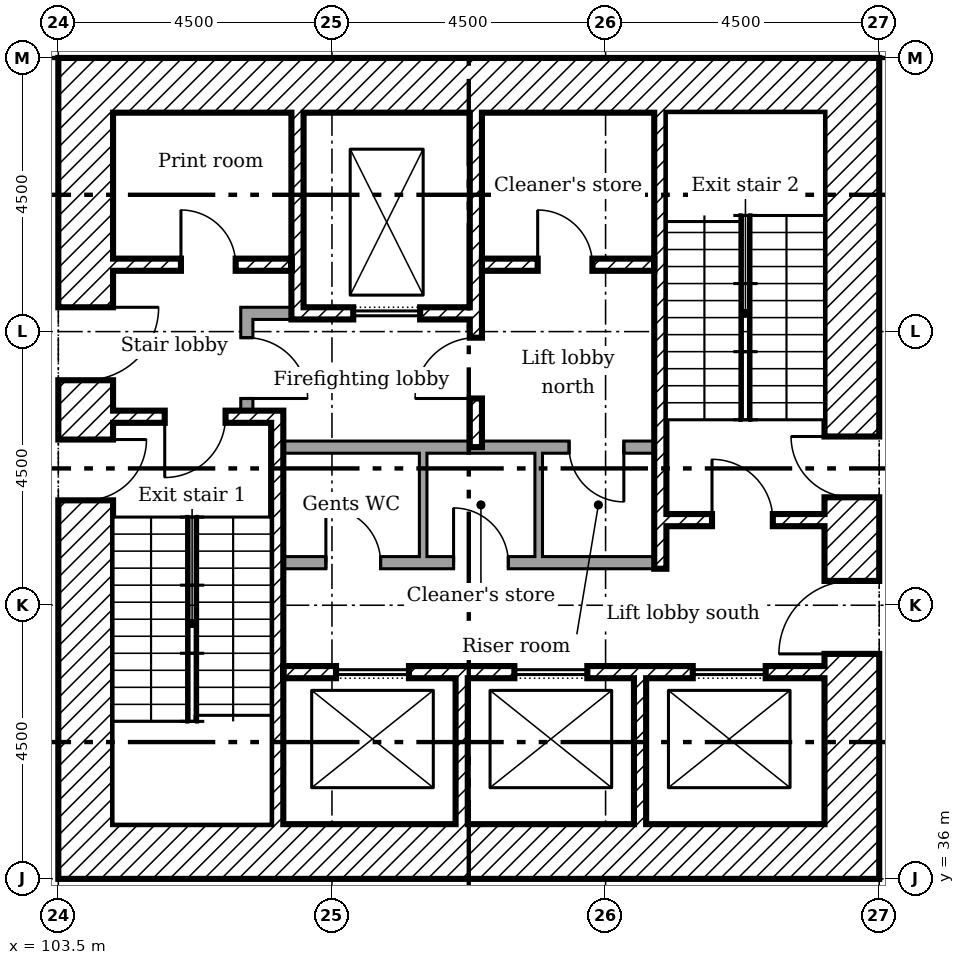
"""IFC4 building model, lengths in metres.
Left out: names, types, materials, properties, quantities, classifications, styles, units other than length and angle.
Written with IfcOpenShell. Run it as: python <this file> out.ifc"""

import sys

from ifc_helpers import new_model, si_unit, direction, frame, frame_2d, origin, place, context, subcontext, project, spatial, rectangle, extrude, element, fill, save


model = new_model("IFC4")
c1 = context("Model", 3, precision=1e-05, world=origin(), true_north=direction((0.0, 1.0)))
c2 = subcontext(c1, "Body", "Model", "MODEL_VIEW")
j1 = project(units=[si_unit("LENGTHUNIT", "METRE"), si_unit("PLANEANGLEUNIT", "RADIAN")], contexts=[c1])
p1 = place(None, origin())
s1 = spatial("IfcSite", under=j1, at=p1, CompositionType="ELEMENT")
p2 = place(p1, origin())
s2 = spatial("IfcBuilding", under=s1, at=p2, CompositionType="ELEMENT")
p3 = place(p2, frame((0.0, 0.0, 21.0)))
s3 = spatial("IfcBuildingStorey", under=s2, at=p3, CompositionType="ELEMENT", Elevation=21.0)
p4 = place(p3, frame((116.55, 36.0, 0.0), z_axis=(0.0, 0.0, 1.0), x_axis=(0.0, 1.0, 0.0)))
e1 = element("IfcWall", 1, at=p4, inside=s3, PredefinedType="SHEAR", context=c2, shape_type="SweptSolid", body=[
    extrude(rectangle(XDim=13.5, YDim=0.9, at=frame_2d((6.75, 0.0))), origin(), (0.0, 0.0, 1.0), 4.125),
])
p5 = place(p4, frame((3.7, 0.0, 0.0)))
e2 = element("IfcOpeningElement", 2, at=p5, cuts=e1, PredefinedType="OPENING", context=c2, shape_type="SweptSolid", body=[
    extrude(rectangle(XDim=1.2, YDim=2.1, at=frame_2d((0.6, 1.05))), frame((0.0, 0.46, 0.0), z_axis=(0.0, -1.0, 0.0), x_axis=(1.0, 0.0, 0.0)), (0.0, 0.0, 1.0), 0.92),
])
p6 = place(p4, frame((6.275, 0.0, 0.0)))
e3 = element("IfcOpeningElement", 3, at=p6, cuts=e1, PredefinedType="OPENING", context=c2, shape_type="SweptSolid", body=[
    extrude(rectangle(XDim=1.0, YDim=2.1, at=frame_2d((0.5, 1.05))), frame((0.0, 0.46, 0.0), z_axis=(0.0, -1.0, 0.0), x_axis=(1.0, 0.0, 0.0)), (0.0, 0.0, 1.0), 0.92),
])
for number, where in (
    (4, (104.4, 49.05, 0.0)),
    (5, (104.4, 36.45, 0.0)),
):
    element("IfcWall", number, at=place(p3, frame(where)), inside=s3, PredefinedType="SHEAR", context=c2, shape_type="SweptSolid", body=[
        extrude(rectangle(XDim=11.7, YDim=0.9, at=frame_2d((5.85, 0.0))), origin(), (0.0, 0.0, 1.0), 4.125),
    ])
p7 = place(p3, frame((103.95, 36.0, 0.0), z_axis=(0.0, 0.0, 1.0), x_axis=(0.0, 1.0, 0.0)))
e6 = element("IfcWall", 6, at=p7, inside=s3, PredefinedType="SHEAR", context=c2, shape_type="SweptSolid", body=[
    extrude(rectangle(XDim=13.5, YDim=0.9, at=frame_2d((6.75, 0.0))), origin(), (0.0, 0.0, 1.0), 4.125),
])
p8 = place(p7, frame((8.2, 0.0, 0.0)))
e7 = element("IfcOpeningElement", 7, at=p8, cuts=e6, PredefinedType="OPENING", context=c2, shape_type="SweptSolid", body=[
    extrude(rectangle(XDim=1.2, YDim=2.1, at=frame_2d((0.6, 1.05))), frame((0.0, 0.46, 0.0), z_axis=(0.0, -1.0, 0.0), x_axis=(1.0, 0.0, 0.0)), (0.0, 0.0, 1.0), 0.92),
])
p9 = place(p7, frame((6.225, 0.0, 0.0)))
e8 = element("IfcOpeningElement", 8, at=p9, cuts=e6, PredefinedType="OPENING", context=c2, shape_type="SweptSolid", body=[
    extrude(rectangle(XDim=1.0, YDim=2.1, at=frame_2d((0.5, 1.05))), frame((0.0, 0.46, 0.0), z_axis=(0.0, -1.0, 0.0), x_axis=(1.0, 0.0, 0.0)), (0.0, 0.0, 1.0), 0.92),
])
p10 = place(p3, frame((107.433, 48.6, 0.0), z_axis=(0.0, 0.0, 1.0), x_axis=(0.0, -1.0, 0.0)))
e9 = element("IfcWall", 9, at=p10, inside=s3, PredefinedType="SHEAR", context=c2, shape_type="SweptSolid", body=[
    extrude(rectangle(XDim=3.4, YDim=0.2, at=frame_2d((1.7, 0.0))), origin(), (0.0, 0.0, 1.0), 4.125),
])
p11 = place(p3, frame((110.367, 48.6, 0.0), z_axis=(0.0, 0.0, 1.0), x_axis=(0.0, -1.0, 0.0)))
e10 = element("IfcWall", 10, at=p11, inside=s3, PredefinedType="SHEAR", context=c2, shape_type="SweptSolid", body=[
    extrude(rectangle(XDim=5.5, YDim=0.2, at=frame_2d((2.75, 0.0))), origin(), (0.0, 0.0, 1.0), 4.125),
])
p12 = place(p11, frame((3.7, 0.0, 0.0)))
e11 = element("IfcOpeningElement", 11, at=p12, cuts=e10, PredefinedType="OPENING", context=c2, shape_type="SweptSolid", body=[
    extrude(rectangle(XDim=1.0, YDim=2.1, at=frame_2d((0.5, 1.05))), frame((0.0, 0.11, 0.0), z_axis=(0.0, -1.0, 0.0), x_axis=(1.0, 0.0, 0.0)), (0.0, 0.0, 1.0), 0.22),
])
for number, where, z_axis, x_axis in (
    (12, (110.133, 36.9, 0.0), (0.0, 0.0, 1.0), (0.0, 1.0, 0.0)),
    (13, (113.067, 36.9, 0.0), (0.0, 0.0, 1.0), (0.0, 1.0, 0.0)),
):
    element("IfcWall", number, at=place(p3, frame(where, z_axis=z_axis, x_axis=x_axis)), inside=s3, PredefinedType="SHEAR", context=c2, shape_type="SweptSolid", body=[
        extrude(rectangle(XDim=2.4, YDim=0.2, at=frame_2d((1.2, 0.0))), origin(), (0.0, 0.0, 1.0), 4.125),
    ])
p13 = place(p3, frame((106.5, 45.3, 0.0)))
e14 = element("IfcWall", 14, at=p13, inside=s3, PredefinedType="PARTITIONING", context=c2, shape_type="SweptSolid", body=[
    extrude(rectangle(XDim=0.833, YDim=0.2, at=frame_2d((0.417, 0.0))), origin(), (0.0, 0.0, 1.0), 4.125),
])
p14 = place(p3, frame((106.6, 43.7, 0.0), z_axis=(0.0, 0.0, 1.0), x_axis=(0.0, 1.0, 0.0)))
e15 = element("IfcWall", 15, at=p14, inside=s3, PredefinedType="PARTITIONING", context=c2, shape_type="SweptSolid", body=[
    extrude(rectangle(XDim=1.5, YDim=0.2, at=frame_2d((0.75, 0.0))), origin(), (0.0, 0.0, 1.0), 4.125),
])
p15 = place(p14, frame((0.2, 0.0, 0.0)))
e16 = element("IfcOpeningElement", 16, at=p15, cuts=e15, PredefinedType="OPENING", context=c2, shape_type="SweptSolid", body=[
    extrude(rectangle(XDim=1.0, YDim=2.1, at=frame_2d((0.5, 1.05))), frame((0.0, 0.11, 0.0), z_axis=(0.0, -1.0, 0.0), x_axis=(1.0, 0.0, 0.0)), (0.0, 0.0, 1.0), 0.22),
])
p16 = place(p3, frame((104.4, 46.1, 0.0)))
e17 = element("IfcWall", 17, at=p16, inside=s3, PredefinedType="SHEAR", context=c2, shape_type="SweptSolid", body=[
    extrude(rectangle(XDim=2.933, YDim=0.2, at=frame_2d((1.467, 0.0))), origin(), (0.0, 0.0, 1.0), 4.125),
])
p17 = place(p16, frame((1.117, 0.0, 0.0)))
e18 = element("IfcOpeningElement", 18, at=p17, cuts=e17, PredefinedType="OPENING", context=c2, shape_type="SweptSolid", body=[
    extrude(rectangle(XDim=0.9, YDim=2.1, at=frame_2d((0.45, 1.05))), frame((0.0, 0.11, 0.0), z_axis=(0.0, -1.0, 0.0), x_axis=(1.0, 0.0, 0.0)), (0.0, 0.0, 1.0), 0.22),
])
p18 = place(p3, frame((110.467, 46.1, 0.0)))
e19 = element("IfcWall", 19, at=p18, inside=s3, PredefinedType="SHEAR", context=c2, shape_type="SweptSolid", body=[
    extrude(rectangle(XDim=2.833, YDim=0.2, at=frame_2d((1.417, 0.0))), origin(), (0.0, 0.0, 1.0), 4.125),
])
p19 = place(p18, frame((0.917, 0.0, 0.0)))
e20 = element("IfcOpeningElement", 20, at=p19, cuts=e19, PredefinedType="OPENING", context=c2, shape_type="SweptSolid", body=[
    extrude(rectangle(XDim=0.9, YDim=2.1, at=frame_2d((0.45, 1.05))), frame((0.0, 0.11, 0.0), z_axis=(0.0, -1.0, 0.0), x_axis=(1.0, 0.0, 0.0)), (0.0, 0.0, 1.0), 0.22),
])
p20 = place(p3, frame((107.533, 45.3, 0.0)))
e21 = element("IfcWall", 21, at=p20, inside=s3, PredefinedType="SHEAR", context=c2, shape_type="SweptSolid", body=[
    extrude(rectangle(XDim=2.733, YDim=0.2, at=frame_2d((1.367, 0.0))), origin(), (0.0, 0.0, 1.0), 4.125),
])
p21 = place(p20, frame((0.817, 0.0, 0.0)))
e22 = element("IfcOpeningElement", 22, at=p21, cuts=e21, PredefinedType="OPENING", context=c2, shape_type="SweptSolid", body=[
    extrude(rectangle(XDim=1.1, YDim=2.1, at=frame_2d((0.55, 1.05))), frame((0.0, 0.11, 0.0), z_axis=(0.0, -1.0, 0.0), x_axis=(1.0, 0.0, 0.0)), (0.0, 0.0, 1.0), 0.22),
])
p22 = place(p3, frame((107.2, 39.4, 0.0)))
e23 = element("IfcWall", 23, at=p22, inside=s3, PredefinedType="SHEAR", context=c2, shape_type="SweptSolid", body=[
    extrude(rectangle(XDim=8.9, YDim=0.2, at=frame_2d((4.45, 0.0))), origin(), (0.0, 0.0, 1.0), 4.125),
])
p23 = place(p22, frame((0.867, 0.0, 0.0)))
e24 = element("IfcOpeningElement", 24, at=p23, cuts=e23, PredefinedType="OPENING", context=c2, shape_type="SweptSolid", body=[
    extrude(rectangle(XDim=1.2, YDim=2.1, at=frame_2d((0.6, 1.05))), frame((0.0, 0.11, 0.0), z_axis=(0.0, -1.0, 0.0), x_axis=(1.0, 0.0, 0.0)), (0.0, 0.0, 1.0), 0.22),
])
p24 = place(p22, frame((3.8, 0.0, 0.0)))
e25 = element("IfcOpeningElement", 25, at=p24, cuts=e23, PredefinedType="OPENING", context=c2, shape_type="SweptSolid", body=[
    extrude(rectangle(XDim=1.2, YDim=2.1, at=frame_2d((0.6, 1.05))), frame((0.0, 0.11, 0.0), z_axis=(0.0, -1.0, 0.0), x_axis=(1.0, 0.0, 0.0)), (0.0, 0.0, 1.0), 0.22),
])
p25 = place(p22, frame((6.733, 0.0, 0.0)))
e26 = element("IfcOpeningElement", 26, at=p25, cuts=e23, PredefinedType="OPENING", context=c2, shape_type="SweptSolid", body=[
    extrude(rectangle(XDim=1.2, YDim=2.1, at=frame_2d((0.6, 1.05))), frame((0.0, 0.11, 0.0), z_axis=(0.0, -1.0, 0.0), x_axis=(1.0, 0.0, 0.0)), (0.0, 0.0, 1.0), 0.22),
])
p26 = place(p3, frame((107.1, 36.9, 0.0), z_axis=(0.0, 0.0, 1.0), x_axis=(0.0, 1.0, 0.0)))
e27 = element("IfcWall", 27, at=p26, inside=s3, PredefinedType="SHEAR", context=c2, shape_type="SweptSolid", body=[
    extrude(rectangle(XDim=6.8, YDim=0.2, at=frame_2d((3.4, 0.0))), origin(), (0.0, 0.0, 1.0), 4.125),
])
p27 = place(p3, frame((104.4, 43.6, 0.0)))
e28 = element("IfcWall", 28, at=p27, inside=s3, PredefinedType="SHEAR", context=c2, shape_type="SweptSolid", body=[
    extrude(rectangle(XDim=2.6, YDim=0.2, at=frame_2d((1.3, 0.0))), origin(), (0.0, 0.0, 1.0), 4.125),
])
p28 = place(p27, frame((0.85, 0.0, 0.0)))
e29 = element("IfcOpeningElement", 29, at=p28, cuts=e28, PredefinedType="OPENING", context=c2, shape_type="SweptSolid", body=[
    extrude(rectangle(XDim=1.0, YDim=2.1, at=frame_2d((0.5, 1.05))), frame((0.0, 0.11, 0.0), z_axis=(0.0, -1.0, 0.0), x_axis=(1.0, 0.0, 0.0)), (0.0, 0.0, 1.0), 0.22),
])
p29 = place(p3, frame((113.5, 41.9, 0.0)))
e30 = element("IfcWall", 30, at=p29, inside=s3, PredefinedType="SHEAR", context=c2, shape_type="SweptSolid", body=[
    extrude(rectangle(XDim=2.6, YDim=0.2, at=frame_2d((1.3, 0.0))), origin(), (0.0, 0.0, 1.0), 4.125),
])
p30 = place(p29, frame((0.75, 0.0, 0.0)))
e31 = element("IfcOpeningElement", 31, at=p30, cuts=e30, PredefinedType="OPENING", context=c2, shape_type="SweptSolid", body=[
    extrude(rectangle(XDim=1.0, YDim=2.1, at=frame_2d((0.5, 1.05))), frame((0.0, 0.11, 0.0), z_axis=(0.0, -1.0, 0.0), x_axis=(1.0, 0.0, 0.0)), (0.0, 0.0, 1.0), 0.22),
])
p31 = place(p3, frame((113.4, 41.1, 0.0), z_axis=(0.0, 0.0, 1.0), x_axis=(0.0, 1.0, 0.0)))
e32 = element("IfcWall", 32, at=p31, inside=s3, PredefinedType="SHEAR", context=c2, shape_type="SweptSolid", body=[
    extrude(rectangle(XDim=7.5, YDim=0.2, at=frame_2d((3.75, 0.0))), origin(), (0.0, 0.0, 1.0), 4.125),
])
p32 = place(p3, frame((107.2, 43.1, 0.0)))
e33 = element("IfcWall", 33, at=p32, inside=s3, PredefinedType="PARTITIONING", context=c2, shape_type="SweptSolid", body=[
    extrude(rectangle(XDim=6.1, YDim=0.2, at=frame_2d((3.05, 0.0))), origin(), (0.0, 0.0, 1.0), 4.125),
])
p33 = place(p32, frame((4.7, 0.0, 0.0)))
e34 = element("IfcOpeningElement", 34, at=p33, cuts=e33, PredefinedType="OPENING", context=c2, shape_type="SweptSolid", body=[
    extrude(rectangle(XDim=0.9, YDim=2.1, at=frame_2d((0.45, 1.05))), frame((0.0, 0.11, 0.0), z_axis=(0.0, -1.0, 0.0), x_axis=(1.0, 0.0, 0.0)), (0.0, 0.0, 1.0), 0.22),
])
p34 = place(p3, frame((107.2, 41.2, 0.0)))
e35 = element("IfcWall", 35, at=p34, inside=s3, PredefinedType="PARTITIONING", context=c2, shape_type="SweptSolid", body=[
    extrude(rectangle(XDim=6.1, YDim=0.2, at=frame_2d((3.05, 0.0))), origin(), (0.0, 0.0, 1.0), 4.125),
])
p35 = place(p34, frame((0.7, 0.0, 0.0)))
e36 = element("IfcOpeningElement", 36, at=p35, cuts=e35, PredefinedType="OPENING", context=c2, shape_type="SweptSolid", body=[
    extrude(rectangle(XDim=0.9, YDim=2.1, at=frame_2d((0.45, 1.05))), frame((0.0, 0.11, 0.0), z_axis=(0.0, -1.0, 0.0), x_axis=(1.0, 0.0, 0.0)), (0.0, 0.0, 1.0), 0.22),
])
p36 = place(p34, frame((2.8, 0.0, 0.0)))
e37 = element("IfcOpeningElement", 37, at=p36, cuts=e35, PredefinedType="OPENING", context=c2, shape_type="SweptSolid", body=[
    extrude(rectangle(XDim=0.9, YDim=2.1, at=frame_2d((0.45, 1.05))), frame((0.0, 0.11, 0.0), z_axis=(0.0, -1.0, 0.0), x_axis=(1.0, 0.0, 0.0)), (0.0, 0.0, 1.0), 0.22),
])
for number, where, z_axis, x_axis in (
    (38, (109.5, 41.3, 0.0), (0.0, 0.0, 1.0), (0.0, 1.0, 0.0)),
    (39, (111.4, 41.3, 0.0), (0.0, 0.0, 1.0), (0.0, 1.0, 0.0)),
):
    element("IfcWall", number, at=place(p3, frame(where, z_axis=z_axis, x_axis=x_axis)), inside=s3, PredefinedType="PARTITIONING", context=c2, shape_type="SweptSolid", body=[
        extrude(rectangle(XDim=1.7, YDim=0.125, at=frame_2d((0.85, 0.0))), origin(), (0.0, 0.0, 1.0), 4.125),
    ])
p37 = place(p8, frame((1.2, 0.0, 0.0), x_axis=(-1.0, 0.0, 0.0)))
e40 = element("IfcDoor", 40, at=p37, inside=s3, OperationType="SINGLE_SWING_RIGHT", PredefinedType="DOOR", context=c2, shape_type="SweptSolid", body=[
    extrude(rectangle(XDim=1.2, YDim=2.1, at=frame_2d((0.6, 1.05))), frame((0.0, 0.025, 0.0), z_axis=(0.0, -1.0, 0.0), x_axis=(1.0, 0.0, 0.0)), (0.0, 0.0, 1.0), 0.05),
])
fill(e7, e40)
p38 = place(p5, origin())
e41 = element("IfcDoor", 41, at=p38, inside=s3, OperationType="SINGLE_SWING_RIGHT", PredefinedType="DOOR", context=c2, shape_type="SweptSolid", body=[
    extrude(rectangle(XDim=1.2, YDim=2.1, at=frame_2d((0.6, 1.05))), frame((0.0, 0.025, 0.0), z_axis=(0.0, -1.0, 0.0), x_axis=(1.0, 0.0, 0.0)), (0.0, 0.0, 1.0), 0.05),
])
fill(e2, e41)
p39 = place(p28, frame((1.0, 0.0, 0.0), x_axis=(-1.0, 0.0, 0.0)))
e42 = element("IfcDoor", 42, at=p39, inside=s3, OperationType="SINGLE_SWING_LEFT", PredefinedType="DOOR", context=c2, shape_type="SweptSolid", body=[
    extrude(rectangle(XDim=1.0, YDim=2.1, at=frame_2d((0.5, 1.05))), frame((0.0, 0.025, 0.0), z_axis=(0.0, -1.0, 0.0), x_axis=(1.0, 0.0, 0.0)), (0.0, 0.0, 1.0), 0.05),
])
fill(e29, e42)
p40 = place(p9, frame((1.0, 0.0, 0.0), x_axis=(-1.0, 0.0, 0.0)))
e43 = element("IfcDoor", 43, at=p40, inside=s3, OperationType="SINGLE_SWING_RIGHT", PredefinedType="DOOR", context=c2, shape_type="SweptSolid", body=[
    extrude(rectangle(XDim=1.0, YDim=2.1, at=frame_2d((0.5, 1.05))), frame((0.0, 0.025, 0.0), z_axis=(0.0, -1.0, 0.0), x_axis=(1.0, 0.0, 0.0)), (0.0, 0.0, 1.0), 0.05),
])
fill(e8, e43)
p41 = place(p30, origin())
e44 = element("IfcDoor", 44, at=p41, inside=s3, OperationType="SINGLE_SWING_RIGHT", PredefinedType="DOOR", context=c2, shape_type="SweptSolid", body=[
    extrude(rectangle(XDim=1.0, YDim=2.1, at=frame_2d((0.5, 1.05))), frame((0.0, 0.025, 0.0), z_axis=(0.0, -1.0, 0.0), x_axis=(1.0, 0.0, 0.0)), (0.0, 0.0, 1.0), 0.05),
])
fill(e31, e44)
p42 = place(p6, origin())
e45 = element("IfcDoor", 45, at=p42, inside=s3, OperationType="SINGLE_SWING_LEFT", PredefinedType="DOOR", context=c2, shape_type="SweptSolid", body=[
    extrude(rectangle(XDim=1.0, YDim=2.1, at=frame_2d((0.5, 1.05))), frame((0.0, 0.025, 0.0), z_axis=(0.0, -1.0, 0.0), x_axis=(1.0, 0.0, 0.0)), (0.0, 0.0, 1.0), 0.05),
])
fill(e3, e45)
p43 = place(p12, frame((1.0, 0.0, 0.0), x_axis=(-1.0, 0.0, 0.0)))
e46 = element("IfcDoor", 46, at=p43, inside=s3, OperationType="SINGLE_SWING_RIGHT", PredefinedType="DOOR", context=c2, shape_type="SweptSolid", body=[
    extrude(rectangle(XDim=1.0, YDim=2.1, at=frame_2d((0.5, 1.05))), frame((0.0, 0.025, 0.0), z_axis=(0.0, -1.0, 0.0), x_axis=(1.0, 0.0, 0.0)), (0.0, 0.0, 1.0), 0.05),
])
fill(e11, e46)
p44 = place(p15, frame((1.0, 0.0, 0.0), x_axis=(-1.0, 0.0, 0.0)))
e47 = element("IfcDoor", 47, at=p44, inside=s3, OperationType="SINGLE_SWING_LEFT", PredefinedType="DOOR", context=c2, shape_type="SweptSolid", body=[
    extrude(rectangle(XDim=1.0, YDim=2.1, at=frame_2d((0.5, 1.05))), frame((0.0, 0.025, 0.0), z_axis=(0.0, -1.0, 0.0), x_axis=(1.0, 0.0, 0.0)), (0.0, 0.0, 1.0), 0.05),
])
fill(e16, e47)
p45 = place(p17, origin())
e48 = element("IfcDoor", 48, at=p45, inside=s3, OperationType="SINGLE_SWING_RIGHT", PredefinedType="DOOR", context=c2, shape_type="SweptSolid", body=[
    extrude(rectangle(XDim=0.9, YDim=2.1, at=frame_2d((0.45, 1.05))), frame((0.0, 0.025, 0.0), z_axis=(0.0, -1.0, 0.0), x_axis=(1.0, 0.0, 0.0)), (0.0, 0.0, 1.0), 0.05),
])
fill(e18, e48)
p46 = place(p19, origin())
e49 = element("IfcDoor", 49, at=p46, inside=s3, OperationType="SINGLE_SWING_RIGHT", PredefinedType="DOOR", context=c2, shape_type="SweptSolid", body=[
    extrude(rectangle(XDim=0.9, YDim=2.1, at=frame_2d((0.45, 1.05))), frame((0.0, 0.025, 0.0), z_axis=(0.0, -1.0, 0.0), x_axis=(1.0, 0.0, 0.0)), (0.0, 0.0, 1.0), 0.05),
])
fill(e20, e49)
p47 = place(p35, origin())
e50 = element("IfcDoor", 50, at=p47, inside=s3, OperationType="SINGLE_SWING_RIGHT", PredefinedType="DOOR", context=c2, shape_type="SweptSolid", body=[
    extrude(rectangle(XDim=0.9, YDim=2.1, at=frame_2d((0.45, 1.05))), frame((0.0, 0.025, 0.0), z_axis=(0.0, -1.0, 0.0), x_axis=(1.0, 0.0, 0.0)), (0.0, 0.0, 1.0), 0.05),
])
fill(e36, e50)
p48 = place(p36, origin())
e51 = element("IfcDoor", 51, at=p48, inside=s3, OperationType="SINGLE_SWING_RIGHT", PredefinedType="DOOR", context=c2, shape_type="SweptSolid", body=[
    extrude(rectangle(XDim=0.9, YDim=2.1, at=frame_2d((0.45, 1.05))), frame((0.0, 0.025, 0.0), z_axis=(0.0, -1.0, 0.0), x_axis=(1.0, 0.0, 0.0)), (0.0, 0.0, 1.0), 0.05),
])
fill(e37, e51)
p49 = place(p33, frame((0.9, 0.0, 0.0), x_axis=(-1.0, 0.0, 0.0)))
e52 = element("IfcDoor", 52, at=p49, inside=s3, OperationType="SINGLE_SWING_RIGHT", PredefinedType="DOOR", context=c2, shape_type="SweptSolid", body=[
    extrude(rectangle(XDim=0.9, YDim=2.1, at=frame_2d((0.45, 1.05))), frame((0.0, 0.025, 0.0), z_axis=(0.0, -1.0, 0.0), x_axis=(1.0, 0.0, 0.0)), (0.0, 0.0, 1.0), 0.05),
])
fill(e34, e52)
p50 = place(p21, origin())
e53 = element("IfcDoor", 53, at=p50, inside=s3, OperationType="SLIDING_TO_LEFT", PredefinedType="DOOR", context=c2, shape_type="SweptSolid", body=[
    extrude(rectangle(XDim=1.1, YDim=2.1, at=frame_2d((0.55, 1.05))), frame((0.0, 0.025, 0.0), z_axis=(0.0, -1.0, 0.0), x_axis=(1.0, 0.0, 0.0)), (0.0, 0.0, 1.0), 0.05),
])
fill(e22, e53)
p51 = place(p23, origin())
e54 = element("IfcDoor", 54, at=p51, inside=s3, OperationType="SLIDING_TO_LEFT", PredefinedType="DOOR", context=c2, shape_type="SweptSolid", body=[
    extrude(rectangle(XDim=1.2, YDim=2.1, at=frame_2d((0.6, 1.05))), frame((0.0, 0.025, 0.0), z_axis=(0.0, -1.0, 0.0), x_axis=(1.0, 0.0, 0.0)), (0.0, 0.0, 1.0), 0.05),
])
fill(e24, e54)
p52 = place(p24, origin())
e55 = element("IfcDoor", 55, at=p52, inside=s3, OperationType="SLIDING_TO_LEFT", PredefinedType="DOOR", context=c2, shape_type="SweptSolid", body=[
    extrude(rectangle(XDim=1.2, YDim=2.1, at=frame_2d((0.6, 1.05))), frame((0.0, 0.025, 0.0), z_axis=(0.0, -1.0, 0.0), x_axis=(1.0, 0.0, 0.0)), (0.0, 0.0, 1.0), 0.05),
])
fill(e25, e55)
p53 = place(p25, origin())
e56 = element("IfcDoor", 56, at=p53, inside=s3, OperationType="SLIDING_TO_LEFT", PredefinedType="DOOR", context=c2, shape_type="SweptSolid", body=[
    extrude(rectangle(XDim=1.2, YDim=2.1, at=frame_2d((0.6, 1.05))), frame((0.0, 0.025, 0.0), z_axis=(0.0, -1.0, 0.0), x_axis=(1.0, 0.0, 0.0)), (0.0, 0.0, 1.0), 0.05),
])
fill(e26, e56)
save(model, sys.argv[1])
